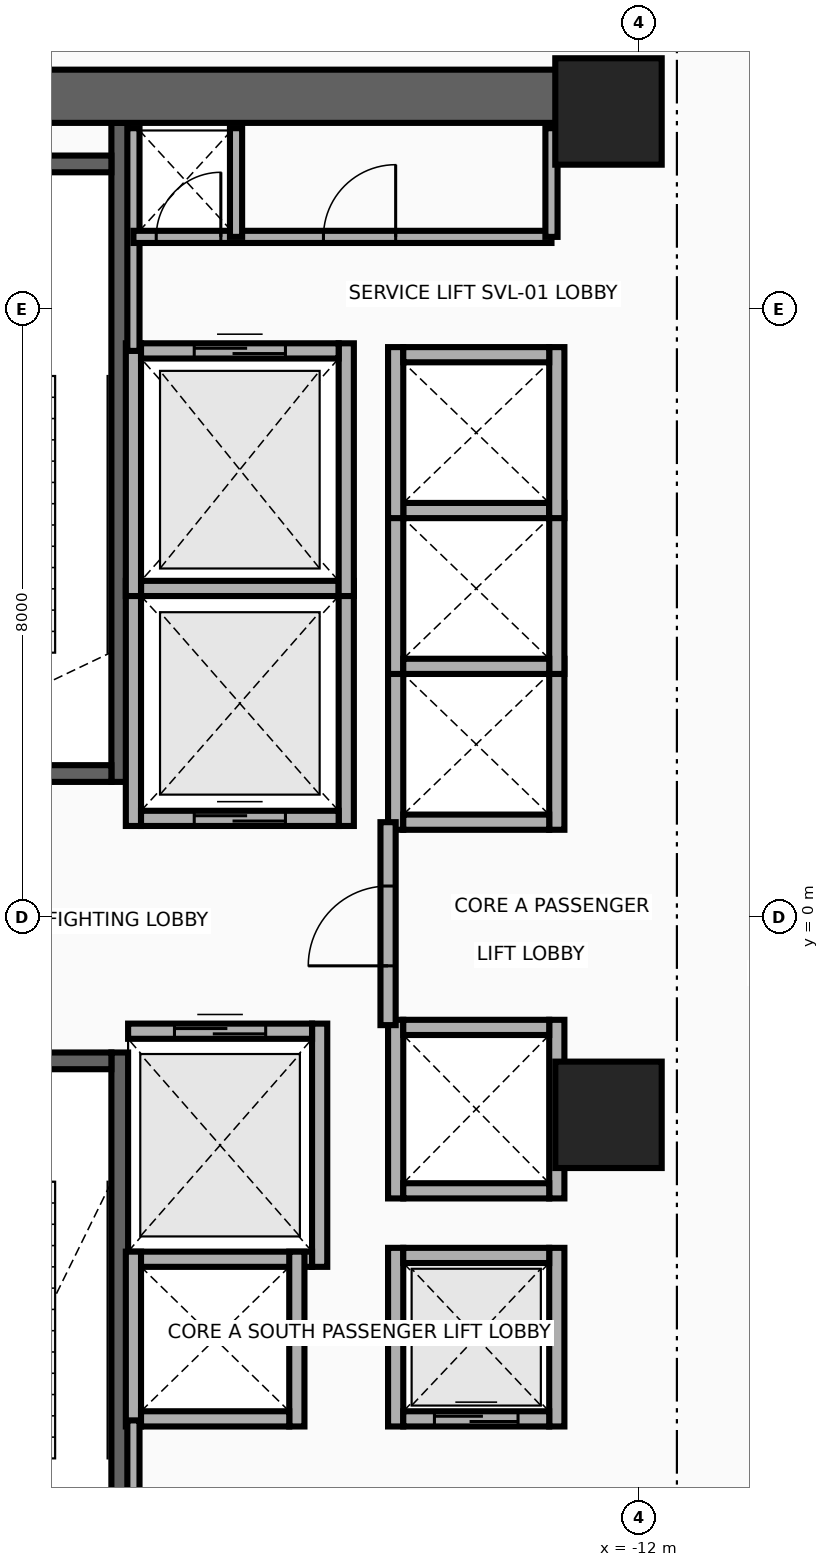
"""IFC4 building model, lengths in metres.
Left out: names, types, materials, properties, quantities, classifications, styles, units other than length and angle.
Written with IfcOpenShell. Run it as: python <this file> out.ifc"""

import sys

from ifc_helpers import new_model, si_unit, direction, frame, frame_2d, origin, origin_2d, place, context, subcontext, project, spatial, rectangle, extrude, source, transform, mapped, element, fill, save


model = new_model("IFC4")
c1 = context("Model", 3, precision=1e-05, world=origin(), true_north=direction((0.0, 1.0)))
c2 = subcontext(c1, "Body", "Model", "MODEL_VIEW")
j1 = project(units=[si_unit("LENGTHUNIT", "METRE"), si_unit("PLANEANGLEUNIT", "RADIAN")], contexts=[c1])
p1 = place(None, origin())
s1 = spatial("IfcSite", under=j1, at=p1, CompositionType="ELEMENT")
p2 = place(p1, origin())
s2 = spatial("IfcBuilding", under=s1, at=p2, CompositionType="ELEMENT")
p3 = place(p2, frame((0.0, 0.0, 96.3)))
s3 = spatial("IfcBuildingStorey", under=s2, at=p3, CompositionType="ELEMENT", Elevation=96.3)
p4 = place(p3, frame((-18.83, 1.78, 0.0), z_axis=(0.0, 0.0, 1.0), x_axis=(0.0, 1.0, 0.0)))
e1 = element("IfcWall", 1, at=p4, inside=s3, PredefinedType="SHEAR", context=c2, shape_type="SweptSolid", body=[
    extrude(rectangle(XDim=8.67, YDim=0.22, at=frame_2d((4.335, 0.0))), origin(), (0.0, 0.0, 1.0), 4.56),
])
p5 = place(p3, frame((-22.05, 1.89, 0.0), z_axis=(0.0, 0.0, 1.0), x_axis=(1.0, 0.0, 0.0)))
e2 = element("IfcWall", 2, at=p5, inside=s3, PredefinedType="SHEAR", context=c2, shape_type="SweptSolid", body=[
    extrude(rectangle(XDim=3.11, YDim=0.22, at=frame_2d((1.555, 0.0))), origin(), (0.0, 0.0, 1.0), 4.56),
])
p6 = place(p5, frame((1.0, 0.0, 0.0)))
e3 = element("IfcOpeningElement", 3, at=p6, cuts=e2, PredefinedType="OPENING", context=c2, shape_type="SweptSolid", body=[
    extrude(rectangle(XDim=1.1, YDim=2.15, at=frame_2d((0.55, 1.075))), frame((0.0, 0.125, 0.0), z_axis=(0.0, -1.0, 0.0), x_axis=(1.0, 0.0, 0.0)), (0.0, 0.0, 1.0), 0.25),
])
p7 = place(p3, frame((-22.05, 9.91, 0.0), z_axis=(0.0, 0.0, 1.0), x_axis=(1.0, 0.0, 0.0)))
e4 = element("IfcWall", 4, at=p7, inside=s3, PredefinedType="SHEAR", context=c2, shape_type="SweptSolid", body=[
    extrude(rectangle(XDim=3.11, YDim=0.22, at=frame_2d((1.555, 0.0))), origin(), (0.0, 0.0, 1.0), 4.56),
])
p8 = place(p3, frame((-18.83, -10.45, 0.0), z_axis=(0.0, 0.0, 1.0), x_axis=(0.0, 1.0, 0.0)))
e5 = element("IfcWall", 5, at=p8, inside=s3, PredefinedType="SHEAR", context=c2, shape_type="SweptSolid", body=[
    extrude(rectangle(XDim=8.67, YDim=0.22, at=frame_2d((4.335, 0.0))), origin(), (0.0, 0.0, 1.0), 4.56),
])
p9 = place(p3, frame((-22.05, -1.89, 0.0), z_axis=(0.0, 0.0, 1.0), x_axis=(1.0, 0.0, 0.0)))
e6 = element("IfcWall", 6, at=p9, inside=s3, PredefinedType="SHEAR", context=c2, shape_type="SweptSolid", body=[
    extrude(rectangle(XDim=3.11, YDim=0.22, at=frame_2d((1.555, 0.0))), origin(), (0.0, 0.0, 1.0), 4.56),
])
p10 = place(p9, frame((1.0, 0.0, 0.0)))
e7 = element("IfcOpeningElement", 7, at=p10, cuts=e6, PredefinedType="OPENING", context=c2, shape_type="SweptSolid", body=[
    extrude(rectangle(XDim=1.1, YDim=2.15, at=frame_2d((0.55, 1.075))), frame((0.0, 0.125, 0.0), z_axis=(0.0, -1.0, 0.0), x_axis=(1.0, 0.0, 0.0)), (0.0, 0.0, 1.0), 0.25),
])
p11 = place(p3, frame((-22.65, 10.8, 0.0), z_axis=(0.0, 0.0, 1.0), x_axis=(1.0, 0.0, 0.0)))
e8 = element("IfcWall", 8, at=p11, inside=s3, PredefinedType="SHEAR", context=c2, shape_type="SweptSolid", body=[
    extrude(rectangle(XDim=10.25, YDim=0.7, at=frame_2d((5.125, 0.0))), origin(), (0.0, 0.0, 1.0), 4.56),
])
m1 = source(origin(), c2, "Body", "SweptSolid", [
    extrude(rectangle(XDim=1.4, YDim=1.4, at=origin_2d()), origin(), (0.0, 0.0, 1.0), 4.8),
])
for number, where, z_axis, x_axis in (
    (9, (-12.4, -2.6, 0.0), (0.0, 0.0, 1.0), (1.0, 0.0, 0.0)),
    (10, (-12.4, 10.6, 0.0), (0.0, 0.0, 1.0), (1.0, 0.0, 0.0)),
):
    element("IfcColumn", number, at=place(p3, frame(where, z_axis=z_axis, x_axis=x_axis)), inside=s3, PredefinedType="COLUMN", context=c2, shape_type="MappedRepresentation", body=[
        mapped(m1, transform((0.0, 0.0, 0.0), x_axis=(1.0, 0.0, 0.0), y_axis=(0.0, 1.0, 0.0), z_axis=(0.0, 0.0, 1.0), scale=1.0)),
    ])
for number, where, z_axis, x_axis in (
    (11, (-18.65, 1.2, 0.0), (0.0, 0.0, 1.0), (0.0, 1.0, 0.0)),
    (12, (-15.85, 1.2, 0.0), (0.0, 0.0, 1.0), (0.0, 1.0, 0.0)),
):
    element("IfcWall", number, at=place(p3, frame(where, z_axis=z_axis, x_axis=x_axis)), inside=s3, PredefinedType="MOVABLE", context=c2, shape_type="SweptSolid", body=[
        extrude(rectangle(XDim=3.225, YDim=0.2, at=frame_2d((1.613, 0.0))), origin(), (0.0, 0.0, 1.0), 4.56),
    ])
p12 = place(p3, frame((-18.55, 1.3, 0.0), z_axis=(0.0, 0.0, 1.0), x_axis=(1.0, 0.0, 0.0)))
e13 = element("IfcWall", 13, at=p12, inside=s3, PredefinedType="MOVABLE", context=c2, shape_type="SweptSolid", body=[
    extrude(rectangle(XDim=2.6, YDim=0.2, at=frame_2d((1.3, 0.0))), origin(), (0.0, 0.0, 1.0), 4.56),
])
p13 = place(p12, frame((0.7, 0.0, 0.0)))
e14 = element("IfcOpeningElement", 14, at=p13, cuts=e13, PredefinedType="OPENING", context=c2, shape_type="SweptSolid", body=[
    extrude(rectangle(XDim=1.2, YDim=2.1, at=frame_2d((0.6, 1.05))), frame((0.0, 0.115, 0.0), z_axis=(0.0, -1.0, 0.0), x_axis=(1.0, 0.0, 0.0)), (0.0, 0.0, 1.0), 0.23),
])
p14 = place(p3, frame((-18.55, 4.325, 0.0), z_axis=(0.0, 0.0, 1.0), x_axis=(1.0, 0.0, 0.0)))
e15 = element("IfcWall", 15, at=p14, inside=s3, PredefinedType="MOVABLE", context=c2, shape_type="SweptSolid", body=[
    extrude(rectangle(XDim=2.6, YDim=0.2, at=frame_2d((1.3, 0.0))), origin(), (0.0, 0.0, 1.0), 4.56),
])
p15 = place(p3, frame((-16.2, -4.6, 0.0), z_axis=(0.0, 0.0, 1.0), x_axis=(0.0, 1.0, 0.0)))
e16 = element("IfcWall", 16, at=p15, inside=s3, PredefinedType="MOVABLE", context=c2, shape_type="SweptSolid", body=[
    extrude(rectangle(XDim=3.2, YDim=0.2, at=frame_2d((1.6, 0.0))), origin(), (0.0, 0.0, 1.0), 4.56),
])
p16 = place(p3, frame((-18.72, -4.5, 0.0), z_axis=(0.0, 0.0, 1.0), x_axis=(1.0, 0.0, 0.0)))
e17 = element("IfcWall", 17, at=p16, inside=s3, PredefinedType="MOVABLE", context=c2, shape_type="SweptSolid", body=[
    extrude(rectangle(XDim=2.42, YDim=0.2, at=frame_2d((1.21, 0.0))), origin(), (0.0, 0.0, 1.0), 4.56),
])
p17 = place(p3, frame((-18.72, -1.5, 0.0), z_axis=(0.0, 0.0, 1.0), x_axis=(1.0, 0.0, 0.0)))
e18 = element("IfcWall", 18, at=p17, inside=s3, PredefinedType="MOVABLE", context=c2, shape_type="SweptSolid", body=[
    extrude(rectangle(XDim=2.42, YDim=0.2, at=frame_2d((1.21, 0.0))), origin(), (0.0, 0.0, 1.0), 4.56),
])
p18 = place(p17, frame((0.61, 0.0, 0.0)))
e19 = element("IfcOpeningElement", 19, at=p18, cuts=e18, PredefinedType="OPENING", context=c2, shape_type="SweptSolid", body=[
    extrude(rectangle(XDim=1.2, YDim=2.1, at=frame_2d((0.6, 1.05))), frame((0.0, 0.115, 0.0), z_axis=(0.0, -1.0, 0.0), x_axis=(1.0, 0.0, 0.0)), (0.0, 0.0, 1.0), 0.23),
])
for number, where, z_axis, x_axis in (
    (20, (-18.65, 4.225, 0.0), (0.0, 0.0, 1.0), (0.0, 1.0, 0.0)),
    (21, (-15.85, 4.225, 0.0), (0.0, 0.0, 1.0), (0.0, 1.0, 0.0)),
):
    element("IfcWall", number, at=place(p3, frame(where, z_axis=z_axis, x_axis=x_axis)), inside=s3, PredefinedType="MOVABLE", context=c2, shape_type="SweptSolid", body=[
        extrude(rectangle(XDim=3.325, YDim=0.2, at=frame_2d((1.663, 0.0))), origin(), (0.0, 0.0, 1.0), 4.56),
    ])
p19 = place(p3, frame((-18.55, 7.45, 0.0), z_axis=(0.0, 0.0, 1.0), x_axis=(1.0, 0.0, 0.0)))
e22 = element("IfcWall", 22, at=p19, inside=s3, PredefinedType="MOVABLE", context=c2, shape_type="SweptSolid", body=[
    extrude(rectangle(XDim=2.6, YDim=0.2, at=frame_2d((1.3, 0.0))), origin(), (0.0, 0.0, 1.0), 4.56),
])
p20 = place(p19, frame((0.7, 0.0, 0.0)))
e23 = element("IfcOpeningElement", 23, at=p20, cuts=e22, PredefinedType="OPENING", context=c2, shape_type="SweptSolid", body=[
    extrude(rectangle(XDim=1.2, YDim=2.1, at=frame_2d((0.6, 1.05))), frame((0.0, 0.115, 0.0), z_axis=(0.0, -1.0, 0.0), x_axis=(1.0, 0.0, 0.0)), (0.0, 0.0, 1.0), 0.23),
])
for number, where, z_axis, x_axis in (
    (24, (-15.2, -6.7, 0.0), (0.0, 0.0, 1.0), (0.0, 1.0, 0.0)),
    (25, (-13.08, -6.7, 0.0), (0.0, 0.0, 1.0), (0.0, 1.0, 0.0)),
):
    element("IfcWall", number, at=place(p3, frame(where, z_axis=z_axis, x_axis=x_axis)), inside=s3, PredefinedType="MOVABLE", context=c2, shape_type="SweptSolid", body=[
        extrude(rectangle(XDim=2.35, YDim=0.2, at=frame_2d((1.175, 0.0))), origin(), (0.0, 0.0, 1.0), 4.56),
    ])
p21 = place(p3, frame((-15.1, -6.6, 0.0), z_axis=(0.0, 0.0, 1.0), x_axis=(1.0, 0.0, 0.0)))
e26 = element("IfcWall", 26, at=p21, inside=s3, PredefinedType="MOVABLE", context=c2, shape_type="SweptSolid", body=[
    extrude(rectangle(XDim=1.92, YDim=0.2, at=frame_2d((0.96, 0.0))), origin(), (0.0, 0.0, 1.0), 4.56),
])
p22 = place(p21, frame((0.41, 0.0, 0.0)))
e27 = element("IfcOpeningElement", 27, at=p22, cuts=e26, PredefinedType="OPENING", context=c2, shape_type="SweptSolid", body=[
    extrude(rectangle(XDim=1.1, YDim=2.1, at=frame_2d((0.55, 1.05))), frame((0.0, 0.115, 0.0), z_axis=(0.0, -1.0, 0.0), x_axis=(1.0, 0.0, 0.0)), (0.0, 0.0, 1.0), 0.23),
])
p23 = place(p3, frame((-15.1, -4.45, 0.0), z_axis=(0.0, 0.0, 1.0), x_axis=(1.0, 0.0, 0.0)))
e28 = element("IfcWall", 28, at=p23, inside=s3, PredefinedType="MOVABLE", context=c2, shape_type="SweptSolid", body=[
    extrude(rectangle(XDim=1.92, YDim=0.2, at=frame_2d((0.96, 0.0))), origin(), (0.0, 0.0, 1.0), 4.56),
])
for number, where, z_axis, x_axis in (
    (29, (-15.2, 1.15, 0.0), (0.0, 0.0, 1.0), (0.0, 1.0, 0.0)),
    (30, (-13.08, 1.15, 0.0), (0.0, 0.0, 1.0), (0.0, 1.0, 0.0)),
):
    element("IfcWall", number, at=place(p3, frame(where, z_axis=z_axis, x_axis=x_axis)), inside=s3, PredefinedType="MOVABLE", context=c2, shape_type="SweptSolid", body=[
        extrude(rectangle(XDim=2.25, YDim=0.2, at=frame_2d((1.125, 0.0))), origin(), (0.0, 0.0, 1.0), 4.56),
    ])
p24 = place(p3, frame((-15.1, 1.25, 0.0), z_axis=(0.0, 0.0, 1.0), x_axis=(1.0, 0.0, 0.0)))
e31 = element("IfcWall", 31, at=p24, inside=s3, PredefinedType="MOVABLE", context=c2, shape_type="SweptSolid", body=[
    extrude(rectangle(XDim=1.92, YDim=0.2, at=frame_2d((0.96, 0.0))), origin(), (0.0, 0.0, 1.0), 4.56),
])
for number, where, z_axis, x_axis in (
    (32, (-15.2, 3.2, 0.0), (0.0, 0.0, 1.0), (0.0, 1.0, 0.0)),
    (33, (-13.08, 3.2, 0.0), (0.0, 0.0, 1.0), (0.0, 1.0, 0.0)),
):
    element("IfcWall", number, at=place(p3, frame(where, z_axis=z_axis, x_axis=x_axis)), inside=s3, PredefinedType="MOVABLE", context=c2, shape_type="SweptSolid", body=[
        extrude(rectangle(XDim=2.25, YDim=0.2, at=frame_2d((1.125, 0.0))), origin(), (0.0, 0.0, 1.0), 4.56),
    ])
for number, where, z_axis, x_axis in (
    (34, (-15.1, 3.3, 0.0), (0.0, 0.0, 1.0), (1.0, 0.0, 0.0)),
    (35, (-15.1, 5.35, 0.0), (0.0, 0.0, 1.0), (1.0, 0.0, 0.0)),
):
    element("IfcWall", number, at=place(p3, frame(where, z_axis=z_axis, x_axis=x_axis)), inside=s3, PredefinedType="MOVABLE", context=c2, shape_type="SweptSolid", body=[
        extrude(rectangle(XDim=1.92, YDim=0.2, at=frame_2d((0.96, 0.0))), origin(), (0.0, 0.0, 1.0), 4.56),
    ])
for number, where, z_axis, x_axis in (
    (36, (-15.2, 5.25, 0.0), (0.0, 0.0, 1.0), (0.0, 1.0, 0.0)),
    (37, (-13.08, 5.25, 0.0), (0.0, 0.0, 1.0), (0.0, 1.0, 0.0)),
):
    element("IfcWall", number, at=place(p3, frame(where, z_axis=z_axis, x_axis=x_axis)), inside=s3, PredefinedType="MOVABLE", context=c2, shape_type="SweptSolid", body=[
        extrude(rectangle(XDim=2.25, YDim=0.2, at=frame_2d((1.125, 0.0))), origin(), (0.0, 0.0, 1.0), 4.56),
    ])
p25 = place(p3, frame((-15.1, 7.4, 0.0), z_axis=(0.0, 0.0, 1.0), x_axis=(1.0, 0.0, 0.0)))
e38 = element("IfcWall", 38, at=p25, inside=s3, PredefinedType="MOVABLE", context=c2, shape_type="SweptSolid", body=[
    extrude(rectangle(XDim=1.92, YDim=0.2, at=frame_2d((0.96, 0.0))), origin(), (0.0, 0.0, 1.0), 4.56),
])
for number, where, z_axis, x_axis in (
    (39, (-18.65, -6.7, 0.0), (0.0, 0.0, 1.0), (0.0, 1.0, 0.0)),
    (40, (-16.5, -6.7, 0.0), (0.0, 0.0, 1.0), (0.0, 1.0, 0.0)),
):
    element("IfcWall", number, at=place(p3, frame(where, z_axis=z_axis, x_axis=x_axis)), inside=s3, PredefinedType="MOVABLE", context=c2, shape_type="SweptSolid", body=[
        extrude(rectangle(XDim=2.3, YDim=0.2, at=frame_2d((1.15, 0.0))), origin(), (0.0, 0.0, 1.0), 4.56),
    ])
p26 = place(p3, frame((-18.55, -6.6, 0.0), z_axis=(0.0, 0.0, 1.0), x_axis=(1.0, 0.0, 0.0)))
e41 = element("IfcWall", 41, at=p26, inside=s3, PredefinedType="MOVABLE", context=c2, shape_type="SweptSolid", body=[
    extrude(rectangle(XDim=1.95, YDim=0.2, at=frame_2d((0.975, 0.0))), origin(), (0.0, 0.0, 1.0), 4.56),
])
for number, where, z_axis, x_axis in (
    (42, (-15.2, -3.7, 0.0), (0.0, 0.0, 1.0), (0.0, 1.0, 0.0)),
    (43, (-13.08, -3.7, 0.0), (0.0, 0.0, 1.0), (0.0, 1.0, 0.0)),
):
    element("IfcWall", number, at=place(p3, frame(where, z_axis=z_axis, x_axis=x_axis)), inside=s3, PredefinedType="MOVABLE", context=c2, shape_type="SweptSolid", body=[
        extrude(rectangle(XDim=2.35, YDim=0.2, at=frame_2d((1.175, 0.0))), origin(), (0.0, 0.0, 1.0), 4.56),
    ])
for number, where, z_axis, x_axis in (
    (44, (-15.1, -3.6, 0.0), (0.0, 0.0, 1.0), (1.0, 0.0, 0.0)),
    (45, (-15.1, -1.45, 0.0), (0.0, 0.0, 1.0), (1.0, 0.0, 0.0)),
):
    element("IfcWall", number, at=place(p3, frame(where, z_axis=z_axis, x_axis=x_axis)), inside=s3, PredefinedType="MOVABLE", context=c2, shape_type="SweptSolid", body=[
        extrude(rectangle(XDim=1.92, YDim=0.2, at=frame_2d((0.96, 0.0))), origin(), (0.0, 0.0, 1.0), 4.56),
    ])
p27 = place(p3, frame((-15.3, -1.42, 0.0), z_axis=(0.0, 0.0, 1.0), x_axis=(0.0, 1.0, 0.0)))
e46 = element("IfcWall", 46, at=p27, inside=s3, PredefinedType="PARTITIONING", context=c2, shape_type="SweptSolid", body=[
    extrude(rectangle(XDim=2.67, YDim=0.2, at=frame_2d((1.335, 0.0))), origin(), (0.0, 0.0, 1.0), 4.56),
])
p28 = place(p27, frame((0.78, 0.0, 0.0)))
e47 = element("IfcOpeningElement", 47, at=p28, cuts=e46, PredefinedType="OPENING", context=c2, shape_type="SweptSolid", body=[
    extrude(rectangle(XDim=1.05, YDim=2.15, at=frame_2d((0.525, 1.075))), frame((0.0, 0.115, 0.0), z_axis=(0.0, -1.0, 0.0), x_axis=(1.0, 0.0, 0.0)), (0.0, 0.0, 1.0), 0.23),
])
p29 = place(p3, frame((-18.65, 7.45, 0.0), z_axis=(0.0, 0.0, 1.0), x_axis=(0.0, 1.0, 0.0)))
e48 = element("IfcWall", 48, at=p29, inside=s3, PredefinedType="PARTITIONING", context=c2, shape_type="SweptSolid", body=[
    extrude(rectangle(XDim=2.93, YDim=0.16, at=frame_2d((1.465, 0.0))), origin(), (0.0, 0.0, 1.0), 4.56),
])
p30 = place(p3, frame((-18.65, -8.18, 0.0), z_axis=(0.0, 0.0, 1.0), x_axis=(0.0, 1.0, 0.0)))
e49 = element("IfcWall", 49, at=p30, inside=s3, PredefinedType="PARTITIONING", context=c2, shape_type="SweptSolid", body=[
    extrude(rectangle(XDim=1.56, YDim=0.16, at=frame_2d((0.78, 0.0))), origin(), (0.0, 0.0, 1.0), 4.56),
])
p31 = place(p3, frame((-18.65, 8.95, 0.0), z_axis=(0.0, 0.0, 1.0), x_axis=(1.0, 0.0, 0.0)))
e50 = element("IfcWall", 50, at=p31, inside=s3, PredefinedType="PARTITIONING", context=c2, shape_type="SweptSolid", body=[
    extrude(rectangle(XDim=5.5, YDim=0.16, at=frame_2d((2.75, 0.0))), origin(), (0.0, 0.0, 1.0), 4.56),
])
p32 = place(p31, frame((0.3, 0.0, 0.0)))
e51 = element("IfcOpeningElement", 51, at=p32, cuts=e50, PredefinedType="OPENING", context=c2, shape_type="SweptSolid", body=[
    extrude(rectangle(XDim=0.85, YDim=2.05, at=frame_2d((0.425, 1.025))), frame((0.0, 0.095, 0.0), z_axis=(0.0, -1.0, 0.0), x_axis=(1.0, 0.0, 0.0)), (0.0, 0.0, 1.0), 0.19),
])
p33 = place(p31, frame((2.5, 0.0, 0.0)))
e52 = element("IfcOpeningElement", 52, at=p33, cuts=e50, PredefinedType="OPENING", context=c2, shape_type="SweptSolid", body=[
    extrude(rectangle(XDim=0.95, YDim=2.15, at=frame_2d((0.475, 1.075))), frame((0.0, 0.095, 0.0), z_axis=(0.0, -1.0, 0.0), x_axis=(1.0, 0.0, 0.0)), (0.0, 0.0, 1.0), 0.19),
])
for number, where, z_axis, x_axis in (
    (53, (-13.15, 8.95, 0.0), (0.0, 0.0, 1.0), (0.0, 1.0, 0.0)),
    (54, (-17.3, 8.95, 0.0), (0.0, 0.0, 1.0), (0.0, 1.0, 0.0)),
):
    element("IfcWall", number, at=place(p3, frame(where, z_axis=z_axis, x_axis=x_axis)), inside=s3, PredefinedType="PARTITIONING", context=c2, shape_type="SweptSolid", body=[
        extrude(rectangle(XDim=1.43, YDim=0.16, at=frame_2d((0.715, 0.0))), origin(), (0.0, 0.0, 1.0), 4.56),
    ])
p34 = place(p13, origin())
e55 = element("IfcDoor", 55, at=p34, inside=s3, OperationType="DOUBLE_DOOR_SLIDING", PredefinedType="DOOR", context=c2, shape_type="SweptSolid", body=[
    extrude(rectangle(XDim=1.2, YDim=2.1, at=frame_2d((0.6, 1.05))), frame((0.0, 0.025, 0.0), z_axis=(0.0, -1.0, 0.0), x_axis=(1.0, 0.0, 0.0)), (0.0, 0.0, 1.0), 0.05),
])
fill(e14, e55)
p35 = place(p18, origin())
e56 = element("IfcDoor", 56, at=p35, inside=s3, OperationType="DOUBLE_DOOR_SLIDING", PredefinedType="DOOR", context=c2, shape_type="SweptSolid", body=[
    extrude(rectangle(XDim=1.2, YDim=2.1, at=frame_2d((0.6, 1.05))), frame((0.0, 0.025, 0.0), z_axis=(0.0, -1.0, 0.0), x_axis=(1.0, 0.0, 0.0)), (0.0, 0.0, 1.0), 0.05),
])
fill(e19, e56)
p36 = place(p20, origin())
e57 = element("IfcDoor", 57, at=p36, inside=s3, OperationType="DOUBLE_DOOR_SLIDING", PredefinedType="DOOR", context=c2, shape_type="SweptSolid", body=[
    extrude(rectangle(XDim=1.2, YDim=2.1, at=frame_2d((0.6, 1.05))), frame((0.0, 0.025, 0.0), z_axis=(0.0, -1.0, 0.0), x_axis=(1.0, 0.0, 0.0)), (0.0, 0.0, 1.0), 0.05),
])
fill(e23, e57)
p37 = place(p22, origin())
e58 = element("IfcDoor", 58, at=p37, inside=s3, OperationType="DOUBLE_DOOR_SLIDING", PredefinedType="DOOR", context=c2, shape_type="SweptSolid", body=[
    extrude(rectangle(XDim=1.1, YDim=2.1, at=frame_2d((0.55, 1.05))), frame((0.0, 0.025, 0.0), z_axis=(0.0, -1.0, 0.0), x_axis=(1.0, 0.0, 0.0)), (0.0, 0.0, 1.0), 0.05),
])
fill(e27, e58)
p38 = place(p28, origin())
e59 = element("IfcDoor", 59, at=p38, inside=s3, OperationType="SINGLE_SWING_RIGHT", PredefinedType="DOOR", context=c2, shape_type="SweptSolid", body=[
    extrude(rectangle(XDim=1.05, YDim=2.15, at=frame_2d((0.525, 1.075))), frame((0.0, 0.025, 0.0), z_axis=(0.0, -1.0, 0.0), x_axis=(1.0, 0.0, 0.0)), (0.0, 0.0, 1.0), 0.05),
])
fill(e47, e59)
p39 = place(p32, origin())
e60 = element("IfcDoor", 60, at=p39, inside=s3, OperationType="SINGLE_SWING_LEFT", PredefinedType="DOOR", context=c2, shape_type="SweptSolid", body=[
    extrude(rectangle(XDim=0.85, YDim=2.05, at=frame_2d((0.425, 1.025))), frame((0.0, 0.025, 0.0), z_axis=(0.0, -1.0, 0.0), x_axis=(1.0, 0.0, 0.0)), (0.0, 0.0, 1.0), 0.05),
])
fill(e51, e60)
p40 = place(p33, origin())
e61 = element("IfcDoor", 61, at=p40, inside=s3, OperationType="SINGLE_SWING_RIGHT", PredefinedType="DOOR", context=c2, shape_type="SweptSolid", body=[
    extrude(rectangle(XDim=0.95, YDim=2.15, at=frame_2d((0.475, 1.075))), frame((0.0, 0.025, 0.0), z_axis=(0.0, -1.0, 0.0), x_axis=(1.0, 0.0, 0.0)), (0.0, 0.0, 1.0), 0.05),
])
fill(e52, e61)
save(model, sys.argv[1])
